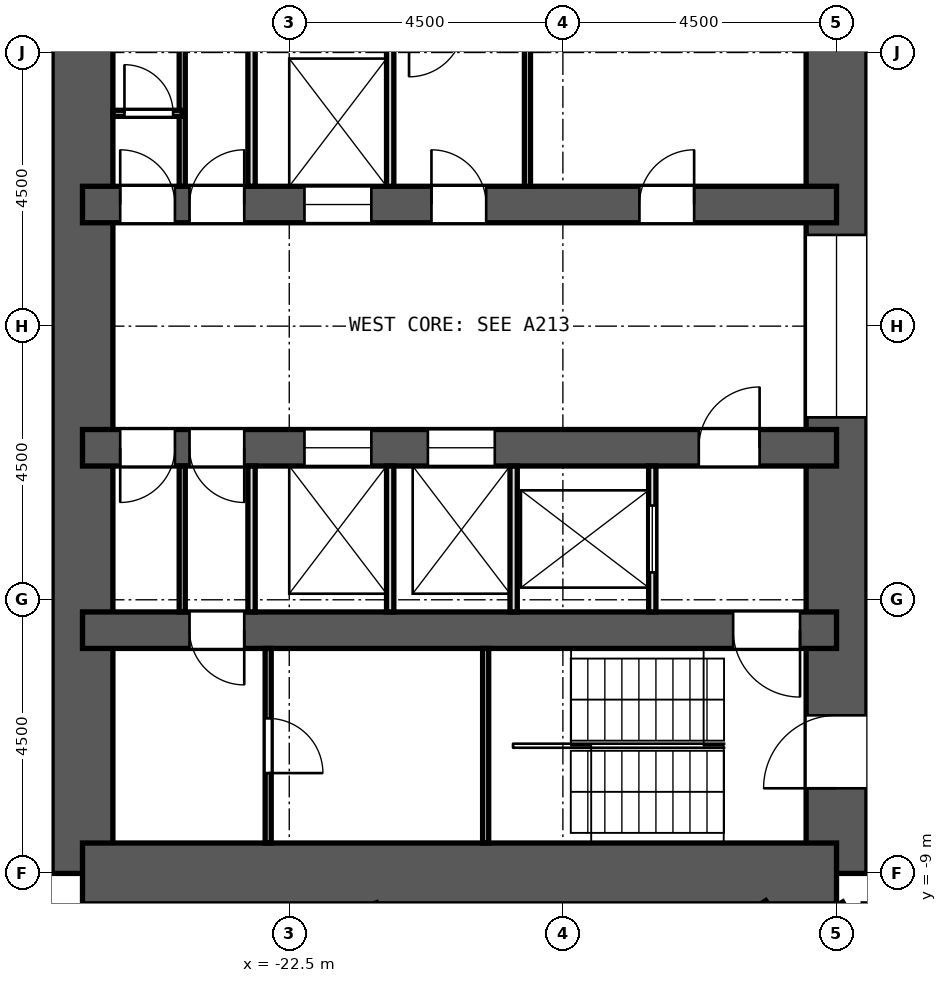
"""IFC4 building model, lengths in metres.
Left out: names, types, materials, properties, quantities, classifications, styles, units other than length and angle.
Written with IfcOpenShell. Run it as: python <this file> out.ifc"""

import sys

from ifc_helpers import new_model, si_unit, direction, frame, frame_2d, origin, place, context, subcontext, project, spatial, rectangle, extrude, element, fill, save


model = new_model("IFC4")
c1 = context("Model", 3, precision=1e-05, world=origin(), true_north=direction((0.0, 1.0)))
c2 = subcontext(c1, "Body", "Model", "MODEL_VIEW")
j1 = project(units=[si_unit("LENGTHUNIT", "METRE"), si_unit("PLANEANGLEUNIT", "RADIAN")], contexts=[c1])
p1 = place(None, origin())
s1 = spatial("IfcSite", under=j1, at=p1, CompositionType="ELEMENT")
p2 = place(p1, origin())
s2 = spatial("IfcBuilding", under=s1, at=p2, CompositionType="ELEMENT")
p3 = place(p2, frame((0.0, 0.0, 65.9)))
s3 = spatial("IfcBuildingStorey", under=s2, at=p3, CompositionType="ELEMENT", Elevation=65.9)
p4 = place(p3, frame((-13.5, -9.0, 0.0), z_axis=(0.0, 0.0, 1.0), x_axis=(0.0, 1.0, 0.0)))
e1 = element("IfcWall", 1, at=p4, inside=s3, PredefinedType="SHEAR", context=c2, shape_type="SweptSolid", body=[
    extrude(rectangle(XDim=18.0, YDim=1.0, at=frame_2d((9.0, 0.0))), origin(), (0.0, 0.0, 1.0), 3.3),
])
p5 = place(p4, frame((15.4, 0.0, 0.0)))
e2 = element("IfcOpeningElement", 2, at=p5, cuts=e1, PredefinedType="OPENING", context=c2, shape_type="SweptSolid", body=[
    extrude(rectangle(XDim=1.2, YDim=2.1, at=frame_2d((0.6, 1.05))), frame((0.0, 0.512, 0.0), z_axis=(0.0, -1.0, 0.0), x_axis=(1.0, 0.0, 0.0)), (0.0, 0.0, 1.0), 1.024),
])
p6 = place(p4, frame((1.4, 0.0, 0.0)))
e3 = element("IfcOpeningElement", 3, at=p6, cuts=e1, PredefinedType="OPENING", context=c2, shape_type="SweptSolid", body=[
    extrude(rectangle(XDim=1.2, YDim=2.1, at=frame_2d((0.6, 1.05))), frame((0.0, 0.512, 0.0), z_axis=(0.0, -1.0, 0.0), x_axis=(1.0, 0.0, 0.0)), (0.0, 0.0, 1.0), 1.024),
])
p7 = place(p4, frame((7.5, 0.0, 0.0)))
e4 = element("IfcOpeningElement", 4, at=p7, cuts=e1, PredefinedType="OPENING", context=c2, shape_type="SweptSolid", body=[
    extrude(rectangle(XDim=3.0, YDim=2.4, at=frame_2d((1.5, 1.2))), frame((0.0, 0.512, 0.0), z_axis=(0.0, -1.0, 0.0), x_axis=(1.0, 0.0, 0.0)), (0.0, 0.0, 1.0), 1.024),
])
p8 = place(p3, frame((-25.9, -9.0, 0.0), z_axis=(0.0, 0.0, 1.0), x_axis=(0.0, 1.0, 0.0)))
e5 = element("IfcWall", 5, at=p8, inside=s3, PredefinedType="SHEAR", context=c2, shape_type="SweptSolid", body=[
    extrude(rectangle(XDim=18.0, YDim=1.0, at=frame_2d((9.0, 0.0))), origin(), (0.0, 0.0, 1.0), 3.3),
])
p9 = place(p3, frame((-13.5, -9.0, 0.0), z_axis=(0.0, 0.0, 1.0), x_axis=(-1.0, 0.0, 0.0)))
e6 = element("IfcWall", 6, at=p9, inside=s3, PredefinedType="SHEAR", context=c2, shape_type="SweptSolid", body=[
    extrude(rectangle(XDim=12.4, YDim=1.0, at=frame_2d((6.2, 0.0))), origin(), (0.0, 0.0, 1.0), 3.3),
])
p10 = place(p3, frame((-13.5, -5.0, 0.0), z_axis=(0.0, 0.0, 1.0), x_axis=(-1.0, 0.0, 0.0)))
e7 = element("IfcWall", 7, at=p10, inside=s3, PredefinedType="SHEAR", context=c2, shape_type="SweptSolid", body=[
    extrude(rectangle(XDim=12.4, YDim=0.6, at=frame_2d((6.2, 0.0))), origin(), (0.0, 0.0, 1.0), 3.3),
])
p11 = place(p10, frame((9.74, 0.0, 0.0)))
e8 = element("IfcOpeningElement", 8, at=p11, cuts=e7, PredefinedType="OPENING", context=c2, shape_type="SweptSolid", body=[
    extrude(rectangle(XDim=0.9, YDim=2.1, at=frame_2d((0.45, 1.05))), frame((0.0, 0.312, 0.0), z_axis=(0.0, -1.0, 0.0), x_axis=(1.0, 0.0, 0.0)), (0.0, 0.0, 1.0), 0.624),
])
p12 = place(p10, frame((0.6, 0.0, 0.0)))
e9 = element("IfcOpeningElement", 9, at=p12, cuts=e7, PredefinedType="OPENING", context=c2, shape_type="SweptSolid", body=[
    extrude(rectangle(XDim=1.1, YDim=2.1, at=frame_2d((0.55, 1.05))), frame((0.0, 0.312, 0.0), z_axis=(0.0, -1.0, 0.0), x_axis=(1.0, 0.0, 0.0)), (0.0, 0.0, 1.0), 0.624),
])
p13 = place(p3, frame((-13.5, 2.0, 0.0), z_axis=(0.0, 0.0, 1.0), x_axis=(-1.0, 0.0, 0.0)))
e10 = element("IfcWall", 10, at=p13, inside=s3, PredefinedType="SHEAR", context=c2, shape_type="SweptSolid", body=[
    extrude(rectangle(XDim=12.4, YDim=0.6, at=frame_2d((6.2, 0.0))), origin(), (0.0, 0.0, 1.0), 3.3),
])
p14 = place(p13, frame((7.65, 0.0, 0.0)))
e11 = element("IfcOpeningElement", 11, at=p14, cuts=e10, PredefinedType="OPENING", context=c2, shape_type="SweptSolid", body=[
    extrude(rectangle(XDim=1.1, YDim=2.1, at=frame_2d((0.55, 1.05))), frame((0.0, 0.312, 0.0), z_axis=(0.0, -1.0, 0.0), x_axis=(1.0, 0.0, 0.0)), (0.0, 0.0, 1.0), 0.624),
])
p15 = place(p13, frame((2.341, 0.0, 0.0)))
e12 = element("IfcOpeningElement", 12, at=p15, cuts=e10, PredefinedType="OPENING", context=c2, shape_type="SweptSolid", body=[
    extrude(rectangle(XDim=0.9, YDim=2.1, at=frame_2d((0.45, 1.05))), frame((0.0, 0.312, 0.0), z_axis=(0.0, -1.0, 0.0), x_axis=(1.0, 0.0, 0.0)), (0.0, 0.0, 1.0), 0.624),
])
p16 = place(p13, frame((5.761, 0.0, 0.0)))
e13 = element("IfcOpeningElement", 13, at=p16, cuts=e10, PredefinedType="OPENING", context=c2, shape_type="SweptSolid", body=[
    extrude(rectangle(XDim=0.9, YDim=2.1, at=frame_2d((0.45, 1.05))), frame((0.0, 0.312, 0.0), z_axis=(0.0, -1.0, 0.0), x_axis=(1.0, 0.0, 0.0)), (0.0, 0.0, 1.0), 0.624),
])
p17 = place(p13, frame((9.74, 0.0, 0.0)))
e14 = element("IfcOpeningElement", 14, at=p17, cuts=e10, PredefinedType="OPENING", context=c2, shape_type="SweptSolid", body=[
    extrude(rectangle(XDim=0.9, YDim=2.1, at=frame_2d((0.45, 1.05))), frame((0.0, 0.312, 0.0), z_axis=(0.0, -1.0, 0.0), x_axis=(1.0, 0.0, 0.0)), (0.0, 0.0, 1.0), 0.624),
])
p18 = place(p13, frame((10.88, 0.0, 0.0)))
e15 = element("IfcOpeningElement", 15, at=p18, cuts=e10, PredefinedType="OPENING", context=c2, shape_type="SweptSolid", body=[
    extrude(rectangle(XDim=0.9, YDim=2.1, at=frame_2d((0.45, 1.05))), frame((0.0, 0.312, 0.0), z_axis=(0.0, -1.0, 0.0), x_axis=(1.0, 0.0, 0.0)), (0.0, 0.0, 1.0), 0.624),
])
p19 = place(p3, frame((-13.5, -2.0, 0.0), z_axis=(0.0, 0.0, 1.0), x_axis=(-1.0, 0.0, 0.0)))
e16 = element("IfcWall", 16, at=p19, inside=s3, PredefinedType="SHEAR", context=c2, shape_type="SweptSolid", body=[
    extrude(rectangle(XDim=12.4, YDim=0.6, at=frame_2d((6.2, 0.0))), origin(), (0.0, 0.0, 1.0), 3.3),
])
p20 = place(p19, frame((5.62, 0.0, 0.0)))
e17 = element("IfcOpeningElement", 17, at=p20, cuts=e16, PredefinedType="OPENING", context=c2, shape_type="SweptSolid", body=[
    extrude(rectangle(XDim=1.1, YDim=2.1, at=frame_2d((0.55, 1.05))), frame((0.0, 0.312, 0.0), z_axis=(0.0, -1.0, 0.0), x_axis=(1.0, 0.0, 0.0)), (0.0, 0.0, 1.0), 0.624),
])
p21 = place(p19, frame((7.65, 0.0, 0.0)))
e18 = element("IfcOpeningElement", 18, at=p21, cuts=e16, PredefinedType="OPENING", context=c2, shape_type="SweptSolid", body=[
    extrude(rectangle(XDim=1.1, YDim=2.1, at=frame_2d((0.55, 1.05))), frame((0.0, 0.312, 0.0), z_axis=(0.0, -1.0, 0.0), x_axis=(1.0, 0.0, 0.0)), (0.0, 0.0, 1.0), 0.624),
])
p22 = place(p19, frame((1.265, 0.0, 0.0)))
e19 = element("IfcOpeningElement", 19, at=p22, cuts=e16, PredefinedType="OPENING", context=c2, shape_type="SweptSolid", body=[
    extrude(rectangle(XDim=1.0, YDim=2.1, at=frame_2d((0.5, 1.05))), frame((0.0, 0.312, 0.0), z_axis=(0.0, -1.0, 0.0), x_axis=(1.0, 0.0, 0.0)), (0.0, 0.0, 1.0), 0.624),
])
p23 = place(p19, frame((9.74, 0.0, 0.0)))
e20 = element("IfcOpeningElement", 20, at=p23, cuts=e16, PredefinedType="OPENING", context=c2, shape_type="SweptSolid", body=[
    extrude(rectangle(XDim=0.9, YDim=2.1, at=frame_2d((0.45, 1.05))), frame((0.0, 0.312, 0.0), z_axis=(0.0, -1.0, 0.0), x_axis=(1.0, 0.0, 0.0)), (0.0, 0.0, 1.0), 0.624),
])
p24 = place(p19, frame((10.88, 0.0, 0.0)))
e21 = element("IfcOpeningElement", 21, at=p24, cuts=e16, PredefinedType="OPENING", context=c2, shape_type="SweptSolid", body=[
    extrude(rectangle(XDim=0.9, YDim=2.1, at=frame_2d((0.45, 1.05))), frame((0.0, 0.312, 0.0), z_axis=(0.0, -1.0, 0.0), x_axis=(1.0, 0.0, 0.0)), (0.0, 0.0, 1.0), 0.624),
])
p25 = place(p3, frame((-27.523, -7.971, 0.0), z_axis=(0.0, 0.0, 1.0), x_axis=(0.342028474173, -0.939689588564, 0.0)))
e22 = element("IfcWall", 22, at=p25, inside=s3, PredefinedType="SOLIDWALL", context=c2, shape_type="SweptSolid", body=[
    extrude(rectangle(XDim=3.846, YDim=0.6, at=frame_2d((1.923, 0.0))), origin(), (0.0, 0.0, 1.0), 2.75),
])
p26 = place(p3, frame((-21.114, -9.5, 0.0), z_axis=(0.0, 0.0, 1.0), x_axis=(0.34403955715, -0.938955155008, 0.0)))
e23 = element("IfcWall", 23, at=p26, inside=s3, PredefinedType="PARTITIONING", context=c2, shape_type="SweptSolid", body=[
    extrude(rectangle(XDim=0.367, YDim=0.1, at=frame_2d((0.184, 0.0))), origin(), (0.0, 0.0, 1.0), 2.75),
])
p27 = place(p3, frame((-13.452, -9.5, 0.0), z_axis=(0.0, 0.0, 1.0), x_axis=(0.49991670217, -0.866073490468, 0.0)))
e24 = element("IfcWall", 24, at=p27, inside=s3, PredefinedType="PARTITIONING", context=c2, shape_type="SweptSolid", body=[
    extrude(rectangle(XDim=0.834, YDim=0.125, at=frame_2d((0.417, 0.0))), origin(), (0.0, 0.0, 1.0), 2.75),
])
p28 = place(p3, frame((-15.737, -10.219, 0.0), z_axis=(0.0, 0.0, 1.0), x_axis=(0.838785586694, 0.544461880717, 0.0)))
e25 = element("IfcWall", 25, at=p28, inside=s3, PredefinedType="PARTITIONING", context=c2, shape_type="SweptSolid", body=[
    extrude(rectangle(XDim=1.321, YDim=0.125, at=frame_2d((0.66, 0.0))), origin(), (0.0, 0.0, 1.0), 2.75),
])
p29 = place(p3, frame((-13.0, -10.22, 0.0), z_axis=(0.0, 0.0, 1.0), x_axis=(0.0, 1.0, 0.0)))
e26 = element("IfcWall", 26, at=p29, inside=s3, PredefinedType="PARTITIONING", context=c2, shape_type="SweptSolid", body=[
    extrude(rectangle(XDim=0.72, YDim=0.125, at=frame_2d((0.36, 0.0))), origin(), (0.0, 0.0, 1.0), 2.75),
])
p30 = place(p3, frame((-18.583, 2.3, 0.0), z_axis=(0.0, 0.0, 1.0), x_axis=(0.0, 1.0, 0.0)))
e27 = element("IfcWall", 27, at=p30, inside=s3, PredefinedType="PARTITIONING", context=c2, shape_type="SweptSolid", body=[
    extrude(rectangle(XDim=2.4, YDim=0.1, at=frame_2d((1.2, 0.0))), origin(), (0.0, 0.0, 1.0), 2.75),
])
for number, where, z_axis, x_axis in (
    (28, (-20.84, 2.3, 0.0), (0.0, 0.0, 1.0), (0.0, 1.0, 0.0)),
    (29, (-23.12, 2.3, 0.0), (0.0, 0.0, 1.0), (0.0, 1.0, 0.0)),
):
    element("IfcWall", number, at=place(p3, frame(where, z_axis=z_axis, x_axis=x_axis)), inside=s3, PredefinedType="PARTITIONING", context=c2, shape_type="SweptSolid", body=[
        extrude(rectangle(XDim=2.4, YDim=0.12, at=frame_2d((1.2, 0.0))), origin(), (0.0, 0.0, 1.0), 2.75),
    ])
p31 = place(p3, frame((-24.26, 2.3, 0.0), z_axis=(0.0, 0.0, 1.0), x_axis=(0.0, 1.0, 0.0)))
e30 = element("IfcWall", 30, at=p31, inside=s3, PredefinedType="PARTITIONING", context=c2, shape_type="SweptSolid", body=[
    extrude(rectangle(XDim=2.4, YDim=0.1, at=frame_2d((1.2, 0.0))), origin(), (0.0, 0.0, 1.0), 2.75),
])
p32 = place(p3, frame((-16.53, -4.7, 0.0), z_axis=(0.0, 0.0, 1.0), x_axis=(0.0, 1.0, 0.0)))
e31 = element("IfcWall", 31, at=p32, inside=s3, PredefinedType="PARTITIONING", context=c2, shape_type="SweptSolid", body=[
    extrude(rectangle(XDim=2.4, YDim=0.12, at=frame_2d((1.2, 0.0))), origin(), (0.0, 0.0, 1.0), 2.75),
])
p33 = place(p32, frame((0.65, 0.0, 0.0)))
e32 = element("IfcOpeningElement", 32, at=p33, cuts=e31, PredefinedType="OPENING", context=c2, shape_type="SweptSolid", body=[
    extrude(rectangle(XDim=1.1, YDim=2.1, at=frame_2d((0.55, 1.05))), frame((0.0, 0.072, 0.0), z_axis=(0.0, -1.0, 0.0), x_axis=(1.0, 0.0, 0.0)), (0.0, 0.0, 1.0), 0.144),
])
for number, where, z_axis, x_axis in (
    (33, (-18.81, -4.7, 0.0), (0.0, 0.0, 1.0), (0.0, 1.0, 0.0)),
    (34, (-20.84, -4.7, 0.0), (0.0, 0.0, 1.0), (0.0, 1.0, 0.0)),
    (35, (-23.12, -4.7, 0.0), (0.0, 0.0, 1.0), (0.0, 1.0, 0.0)),
):
    element("IfcWall", number, at=place(p3, frame(where, z_axis=z_axis, x_axis=x_axis)), inside=s3, PredefinedType="PARTITIONING", context=c2, shape_type="SweptSolid", body=[
        extrude(rectangle(XDim=2.4, YDim=0.12, at=frame_2d((1.2, 0.0))), origin(), (0.0, 0.0, 1.0), 2.75),
    ])
p34 = place(p3, frame((-24.26, -4.7, 0.0), z_axis=(0.0, 0.0, 1.0), x_axis=(0.0, 1.0, 0.0)))
e36 = element("IfcWall", 36, at=p34, inside=s3, PredefinedType="PARTITIONING", context=c2, shape_type="SweptSolid", body=[
    extrude(rectangle(XDim=2.4, YDim=0.1, at=frame_2d((1.2, 0.0))), origin(), (0.0, 0.0, 1.0), 2.75),
])
p35 = place(p3, frame((-24.26, 3.5, 0.0), z_axis=(0.0, 0.0, 1.0), x_axis=(-1.0, 0.0, 0.0)))
e37 = element("IfcWall", 37, at=p35, inside=s3, PredefinedType="PARTITIONING", context=c2, shape_type="SweptSolid", body=[
    extrude(rectangle(XDim=1.14, YDim=0.1, at=frame_2d((0.57, 0.0))), origin(), (0.0, 0.0, 1.0), 2.75),
])
p36 = place(p35, frame((0.15, 0.0, 0.0)))
e38 = element("IfcOpeningElement", 38, at=p36, cuts=e37, PredefinedType="OPENING", context=c2, shape_type="SweptSolid", body=[
    extrude(rectangle(XDim=0.8, YDim=2.1, at=frame_2d((0.4, 1.05))), frame((0.0, 0.062, 0.0), z_axis=(0.0, -1.0, 0.0), x_axis=(1.0, 0.0, 0.0)), (0.0, 0.0, 1.0), 0.124),
])
p37 = place(p3, frame((-19.27, -8.5, 0.0), z_axis=(0.0, 0.0, 1.0), x_axis=(0.0, 1.0, 0.0)))
e39 = element("IfcWall", 39, at=p37, inside=s3, PredefinedType="PARTITIONING", context=c2, shape_type="SweptSolid", body=[
    extrude(rectangle(XDim=3.2, YDim=0.1, at=frame_2d((1.6, 0.0))), origin(), (0.0, 0.0, 1.0), 2.75),
])
p38 = place(p3, frame((-22.846, -8.5, 0.0), z_axis=(0.0, 0.0, 1.0), x_axis=(0.0, 1.0, 0.0)))
e40 = element("IfcWall", 40, at=p38, inside=s3, PredefinedType="PARTITIONING", context=c2, shape_type="SweptSolid", body=[
    extrude(rectangle(XDim=3.2, YDim=0.1, at=frame_2d((1.6, 0.0))), origin(), (0.0, 0.0, 1.0), 2.75),
])
p39 = place(p38, frame((1.15, 0.0, 0.0)))
e41 = element("IfcOpeningElement", 41, at=p39, cuts=e40, PredefinedType="OPENING", context=c2, shape_type="SweptSolid", body=[
    extrude(rectangle(XDim=0.9, YDim=2.1, at=frame_2d((0.45, 1.05))), frame((0.0, 0.062, 0.0), z_axis=(0.0, -1.0, 0.0), x_axis=(1.0, 0.0, 0.0)), (0.0, 0.0, 1.0), 0.124),
])
p40 = place(p14, origin())
e42 = element("IfcDoor", 42, at=p40, inside=s3, OperationType="DOUBLE_DOOR_SLIDING", PredefinedType="DOOR", context=c2, shape_type="SweptSolid", body=[
    extrude(rectangle(XDim=1.1, YDim=2.1, at=frame_2d((0.55, 1.05))), frame((0.0, 0.025, 0.0), z_axis=(0.0, -1.0, 0.0), x_axis=(1.0, 0.0, 0.0)), (0.0, 0.0, 1.0), 0.05),
])
fill(e11, e42)
p41 = place(p33, origin())
e43 = element("IfcDoor", 43, at=p41, inside=s3, OperationType="DOUBLE_DOOR_SLIDING", PredefinedType="DOOR", context=c2, shape_type="SweptSolid", body=[
    extrude(rectangle(XDim=1.1, YDim=2.1, at=frame_2d((0.55, 1.05))), frame((0.0, 0.025, 0.0), z_axis=(0.0, -1.0, 0.0), x_axis=(1.0, 0.0, 0.0)), (0.0, 0.0, 1.0), 0.05),
])
fill(e32, e43)
p42 = place(p20, origin())
e44 = element("IfcDoor", 44, at=p42, inside=s3, OperationType="DOUBLE_DOOR_SLIDING", PredefinedType="DOOR", context=c2, shape_type="SweptSolid", body=[
    extrude(rectangle(XDim=1.1, YDim=2.1, at=frame_2d((0.55, 1.05))), frame((0.0, 0.025, 0.0), z_axis=(0.0, -1.0, 0.0), x_axis=(1.0, 0.0, 0.0)), (0.0, 0.0, 1.0), 0.05),
])
fill(e17, e44)
p43 = place(p21, origin())
e45 = element("IfcDoor", 45, at=p43, inside=s3, OperationType="DOUBLE_DOOR_SLIDING", PredefinedType="DOOR", context=c2, shape_type="SweptSolid", body=[
    extrude(rectangle(XDim=1.1, YDim=2.1, at=frame_2d((0.55, 1.05))), frame((0.0, 0.025, 0.0), z_axis=(0.0, -1.0, 0.0), x_axis=(1.0, 0.0, 0.0)), (0.0, 0.0, 1.0), 0.05),
])
fill(e18, e45)
p44 = place(p15, frame((0.9, 0.0, 0.0), z_axis=(0.0, 0.0, 1.0), x_axis=(-1.0, 0.0, 0.0)))
e46 = element("IfcDoor", 46, at=p44, inside=s3, OperationType="SINGLE_SWING_RIGHT", PredefinedType="DOOR", context=c2, shape_type="SweptSolid", body=[
    extrude(rectangle(XDim=0.9, YDim=2.1, at=frame_2d((0.45, 1.05))), frame((0.0, 0.025, 0.0), z_axis=(0.0, -1.0, 0.0), x_axis=(1.0, 0.0, 0.0)), (0.0, 0.0, 1.0), 0.05),
])
fill(e12, e46)
p45 = place(p16, frame((0.9, 0.0, 0.0), z_axis=(0.0, 0.0, 1.0), x_axis=(-1.0, 0.0, 0.0)))
e47 = element("IfcDoor", 47, at=p45, inside=s3, OperationType="SINGLE_SWING_LEFT", PredefinedType="DOOR", context=c2, shape_type="SweptSolid", body=[
    extrude(rectangle(XDim=0.9, YDim=2.1, at=frame_2d((0.45, 1.05))), frame((0.0, 0.025, 0.0), z_axis=(0.0, -1.0, 0.0), x_axis=(1.0, 0.0, 0.0)), (0.0, 0.0, 1.0), 0.05),
])
fill(e13, e47)
p46 = place(p17, frame((0.9, 0.0, 0.0), z_axis=(0.0, 0.0, 1.0), x_axis=(-1.0, 0.0, 0.0)))
e48 = element("IfcDoor", 48, at=p46, inside=s3, OperationType="SINGLE_SWING_RIGHT", PredefinedType="DOOR", context=c2, shape_type="SweptSolid", body=[
    extrude(rectangle(XDim=0.9, YDim=2.1, at=frame_2d((0.45, 1.05))), frame((0.0, 0.025, 0.0), z_axis=(0.0, -1.0, 0.0), x_axis=(1.0, 0.0, 0.0)), (0.0, 0.0, 1.0), 0.05),
])
fill(e14, e48)
p47 = place(p18, frame((0.9, 0.0, 0.0), z_axis=(0.0, 0.0, 1.0), x_axis=(-1.0, 0.0, 0.0)))
e49 = element("IfcDoor", 49, at=p47, inside=s3, OperationType="SINGLE_SWING_LEFT", PredefinedType="DOOR", context=c2, shape_type="SweptSolid", body=[
    extrude(rectangle(XDim=0.9, YDim=2.1, at=frame_2d((0.45, 1.05))), frame((0.0, 0.025, 0.0), z_axis=(0.0, -1.0, 0.0), x_axis=(1.0, 0.0, 0.0)), (0.0, 0.0, 1.0), 0.05),
])
fill(e15, e49)
p48 = place(p22, frame((1.0, 0.0, 0.0), z_axis=(0.0, 0.0, 1.0), x_axis=(-1.0, 0.0, 0.0)))
e50 = element("IfcDoor", 50, at=p48, inside=s3, OperationType="SINGLE_SWING_RIGHT", PredefinedType="DOOR", context=c2, shape_type="SweptSolid", body=[
    extrude(rectangle(XDim=1.0, YDim=2.1, at=frame_2d((0.5, 1.05))), frame((0.0, 0.025, 0.0), z_axis=(0.0, -1.0, 0.0), x_axis=(1.0, 0.0, 0.0)), (0.0, 0.0, 1.0), 0.05),
])
fill(e19, e50)
p49 = place(p23, origin())
e51 = element("IfcDoor", 51, at=p49, inside=s3, OperationType="SINGLE_SWING_LEFT", PredefinedType="DOOR", context=c2, shape_type="SweptSolid", body=[
    extrude(rectangle(XDim=0.9, YDim=2.1, at=frame_2d((0.45, 1.05))), frame((0.0, 0.025, 0.0), z_axis=(0.0, -1.0, 0.0), x_axis=(1.0, 0.0, 0.0)), (0.0, 0.0, 1.0), 0.05),
])
fill(e20, e51)
p50 = place(p24, origin())
e52 = element("IfcDoor", 52, at=p50, inside=s3, OperationType="SINGLE_SWING_RIGHT", PredefinedType="DOOR", context=c2, shape_type="SweptSolid", body=[
    extrude(rectangle(XDim=0.9, YDim=2.1, at=frame_2d((0.45, 1.05))), frame((0.0, 0.025, 0.0), z_axis=(0.0, -1.0, 0.0), x_axis=(1.0, 0.0, 0.0)), (0.0, 0.0, 1.0), 0.05),
])
fill(e21, e52)
p51 = place(p36, frame((0.8, 0.0, 0.0), z_axis=(0.0, 0.0, 1.0), x_axis=(-1.0, 0.0, 0.0)))
e53 = element("IfcDoor", 53, at=p51, inside=s3, OperationType="SINGLE_SWING_LEFT", PredefinedType="DOOR", context=c2, shape_type="SweptSolid", body=[
    extrude(rectangle(XDim=0.8, YDim=2.1, at=frame_2d((0.4, 1.05))), frame((0.0, 0.025, 0.0), z_axis=(0.0, -1.0, 0.0), x_axis=(1.0, 0.0, 0.0)), (0.0, 0.0, 1.0), 0.05),
])
fill(e38, e53)
p52 = place(p39, frame((0.9, 0.0, 0.0), z_axis=(0.0, 0.0, 1.0), x_axis=(-1.0, 0.0, 0.0)))
e54 = element("IfcDoor", 54, at=p52, inside=s3, OperationType="SINGLE_SWING_RIGHT", PredefinedType="DOOR", context=c2, shape_type="SweptSolid", body=[
    extrude(rectangle(XDim=0.9, YDim=2.1, at=frame_2d((0.45, 1.05))), frame((0.0, 0.025, 0.0), z_axis=(0.0, -1.0, 0.0), x_axis=(1.0, 0.0, 0.0)), (0.0, 0.0, 1.0), 0.05),
])
fill(e41, e54)
p53 = place(p11, origin())
e55 = element("IfcDoor", 55, at=p53, inside=s3, OperationType="SINGLE_SWING_LEFT", PredefinedType="DOOR", context=c2, shape_type="SweptSolid", body=[
    extrude(rectangle(XDim=0.9, YDim=2.1, at=frame_2d((0.45, 1.05))), frame((0.0, 0.025, 0.0), z_axis=(0.0, -1.0, 0.0), x_axis=(1.0, 0.0, 0.0)), (0.0, 0.0, 1.0), 0.05),
])
fill(e8, e55)
p54 = place(p12, origin())
e56 = element("IfcDoor", 56, at=p54, inside=s3, OperationType="SINGLE_SWING_LEFT", PredefinedType="DOOR", context=c2, shape_type="SweptSolid", body=[
    extrude(rectangle(XDim=1.1, YDim=2.1, at=frame_2d((0.55, 1.05))), frame((0.0, 0.025, 0.0), z_axis=(0.0, -1.0, 0.0), x_axis=(1.0, 0.0, 0.0)), (0.0, 0.0, 1.0), 0.05),
])
fill(e9, e56)
p55 = place(p6, origin())
e57 = element("IfcDoor", 57, at=p55, inside=s3, OperationType="SINGLE_SWING_LEFT", PredefinedType="DOOR", context=c2, shape_type="SweptSolid", body=[
    extrude(rectangle(XDim=1.2, YDim=2.1, at=frame_2d((0.6, 1.05))), frame((0.0, 0.025, 0.0), z_axis=(0.0, -1.0, 0.0), x_axis=(1.0, 0.0, 0.0)), (0.0, 0.0, 1.0), 0.05),
])
fill(e3, e57)
p56 = place(p7, origin())
e58 = element("IfcDoor", 58, at=p56, inside=s3, OperationType="DOUBLE_DOOR_SLIDING", PredefinedType="DOOR", context=c2, shape_type="SweptSolid", body=[
    extrude(rectangle(XDim=3.0, YDim=2.4, at=frame_2d((1.5, 1.2))), frame((0.0, 0.025, 0.0), z_axis=(0.0, -1.0, 0.0), x_axis=(1.0, 0.0, 0.0)), (0.0, 0.0, 1.0), 0.05),
])
fill(e4, e58)
save(model, sys.argv[1])
